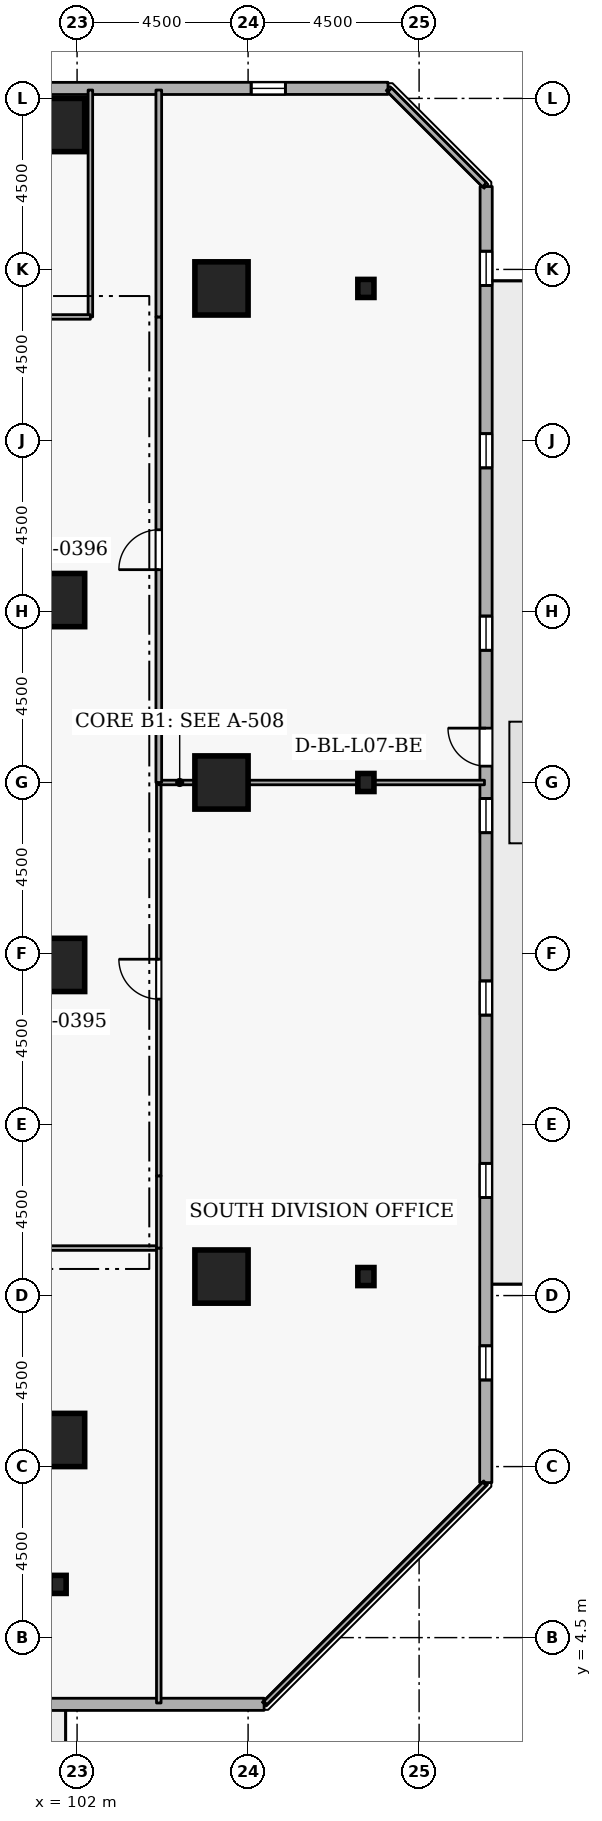
"""IFC4 building model, lengths in metres.
Left out: names, types, materials, properties, quantities, classifications, styles, units other than length and angle.
Written with IfcOpenShell. Run it as: python <this file> out.ifc"""

import sys

from ifc_helpers import new_model, si_unit, direction, frame, frame_2d, origin, origin_2d, place, context, subcontext, project, spatial, rectangle, i_section, extrude, element, fill, save


model = new_model("IFC4")
c1 = context("Model", 3, precision=1e-05, world=origin(), true_north=direction((0.0, 1.0)))
c2 = subcontext(c1, "Body", "Model", "MODEL_VIEW")
j1 = project(units=[si_unit("LENGTHUNIT", "METRE"), si_unit("PLANEANGLEUNIT", "RADIAN")], contexts=[c1])
p1 = place(None, origin())
s1 = spatial("IfcSite", under=j1, at=p1, CompositionType="ELEMENT")
p2 = place(p1, origin())
s2 = spatial("IfcBuilding", under=s1, at=p2, CompositionType="ELEMENT")
p3 = place(p2, frame((0.0, 0.0, 31.5)))
s3 = spatial("IfcBuildingStorey", under=s2, at=p3, CompositionType="ELEMENT", Elevation=31.5)
for number, where, z_axis, x_axis in (
    (1, (105.8, 14.0, 0.0), (0.0, 0.0, 1.0), (1.0, 0.0, 0.0)),
    (2, (105.8, 27.0, 0.0), (0.0, 0.0, 1.0), (1.0, 0.0, 0.0)),
    (3, (105.8, 40.0, 0.0), (0.0, 0.0, 1.0), (1.0, 0.0, 0.0)),
    (4, (101.5, 44.3, 0.0), (0.0, 0.0, 1.0), (1.0, 0.0, 0.0)),
    (5, (101.5, 9.7, 0.0), (0.0, 0.0, 1.0), (1.0, 0.0, 0.0)),
    (6, (101.5, 22.2, 0.0), (0.0, 0.0, 1.0), (1.0, 0.0, 0.0)),
    (7, (101.5, 31.8, 0.0), (0.0, 0.0, 1.0), (1.0, 0.0, 0.0)),
):
    element("IfcColumn", number, at=place(p3, frame(where, z_axis=z_axis, x_axis=x_axis)), inside=s3, PredefinedType="COLUMN", context=c2, shape_type="SweptSolid", body=[
        extrude(rectangle(XDim=1.4, YDim=1.4, at=origin_2d()), origin(), (0.0, 0.0, 1.0), 3.6),
    ])
for number, where, z_axis, x_axis in (
    (8, (109.6, 14.0, 0.0), (0.0, 0.0, 1.0), (1.0, 0.0, 0.0)),
    (9, (109.6, 27.0, 0.0), (0.0, 0.0, 1.0), (1.0, 0.0, 0.0)),
    (10, (109.6, 40.0, 0.0), (0.0, 0.0, 1.0), (1.0, 0.0, 0.0)),
    (11, (101.5, 5.9, 0.0), (0.0, 0.0, 1.0), (1.0, 0.0, 0.0)),
):
    element("IfcColumn", number, at=place(p3, frame(where, z_axis=z_axis, x_axis=x_axis)), inside=s3, PredefinedType="COLUMN", context=c2, shape_type="SweptSolid", body=[
        extrude(i_section(OverallWidth=0.424, OverallDepth=0.475, WebThickness=0.048, FlangeThickness=0.077, FilletRadius=0.015, at=origin_2d()), origin(), (0.0, 0.0, 1.0), 3.6),
    ])
p4 = place(p3, frame((72.819, 2.735, 0.0), z_axis=(0.0, 0.0, 1.0), x_axis=(0.999999952618, 0.000307837676, 0.0)))
e12 = element("IfcWall", 12, at=p4, inside=s3, PredefinedType="STANDARD", context=c2, shape_type="SweptSolid", body=[
    extrude(rectangle(XDim=34.103, YDim=0.32, at=frame_2d((17.051, 0.0))), origin(), (0.0, 0.0, 1.0), 2.7),
])
p5 = place(p4, frame((18.851, 0.0, 0.0)))
e13 = element("IfcOpeningElement", 13, at=p5, cuts=e12, PredefinedType="OPENING", context=c2, shape_type="SweptSolid", body=[
    extrude(rectangle(XDim=1.0, YDim=2.08, at=frame_2d((0.5, 1.04))), frame((0.0, 0.17, 0.0), z_axis=(0.0, -1.0, 0.0), x_axis=(1.0, 0.0, 0.0)), (0.0, 0.0, 1.0), 0.34),
])
p6 = place(p4, frame((2.7, 0.0, 0.72)))
e14 = element("IfcOpeningElement", 14, at=p6, cuts=e12, PredefinedType="OPENING", context=c2, shape_type="SweptSolid", body=[
    extrude(rectangle(XDim=0.9, YDim=1.75, at=frame_2d((0.45, 0.875))), frame((0.0, 0.17, 0.0), z_axis=(0.0, -1.0, 0.0), x_axis=(1.0, 0.0, 0.0)), (0.0, 0.0, 1.0), 0.34),
])
p7 = place(p4, frame((7.5, 0.0, 0.72)))
e15 = element("IfcOpeningElement", 15, at=p7, cuts=e12, PredefinedType="OPENING", context=c2, shape_type="SweptSolid", body=[
    extrude(rectangle(XDim=0.9, YDim=1.75, at=frame_2d((0.45, 0.875))), frame((0.0, 0.17, 0.0), z_axis=(0.0, -1.0, 0.0), x_axis=(1.0, 0.0, 0.0)), (0.0, 0.0, 1.0), 0.34),
])
p8 = place(p4, frame((12.3, 0.0, 0.72)))
e16 = element("IfcOpeningElement", 16, at=p8, cuts=e12, PredefinedType="OPENING", context=c2, shape_type="SweptSolid", body=[
    extrude(rectangle(XDim=0.9, YDim=1.75, at=frame_2d((0.45, 0.875))), frame((0.0, 0.17, 0.0), z_axis=(0.0, -1.0, 0.0), x_axis=(1.0, 0.0, 0.0)), (0.0, 0.0, 1.0), 0.34),
])
p9 = place(p4, frame((17.1, 0.0, 0.72)))
e17 = element("IfcOpeningElement", 17, at=p9, cuts=e12, PredefinedType="OPENING", context=c2, shape_type="SweptSolid", body=[
    extrude(rectangle(XDim=0.9, YDim=1.75, at=frame_2d((0.45, 0.875))), frame((0.0, 0.17, 0.0), z_axis=(0.0, -1.0, 0.0), x_axis=(1.0, 0.0, 0.0)), (0.0, 0.0, 1.0), 0.34),
])
p10 = place(p4, frame((21.9, 0.0, 0.72)))
e18 = element("IfcOpeningElement", 18, at=p10, cuts=e12, PredefinedType="OPENING", context=c2, shape_type="SweptSolid", body=[
    extrude(rectangle(XDim=0.9, YDim=1.75, at=frame_2d((0.45, 0.875))), frame((0.0, 0.17, 0.0), z_axis=(0.0, -1.0, 0.0), x_axis=(1.0, 0.0, 0.0)), (0.0, 0.0, 1.0), 0.34),
])
p11 = place(p4, frame((26.7, 0.0, 0.72)))
e19 = element("IfcOpeningElement", 19, at=p11, cuts=e12, PredefinedType="OPENING", context=c2, shape_type="SweptSolid", body=[
    extrude(rectangle(XDim=0.9, YDim=1.75, at=frame_2d((0.45, 0.875))), frame((0.0, 0.17, 0.0), z_axis=(0.0, -1.0, 0.0), x_axis=(1.0, 0.0, 0.0)), (0.0, 0.0, 1.0), 0.34),
])
p12 = place(p3, frame((112.754, 8.579, 0.0), z_axis=(0.0, 0.0, 1.0), x_axis=(0.000307837676, 0.999999952618, 0.0)))
e20 = element("IfcWall", 20, at=p12, inside=s3, PredefinedType="STANDARD", context=c2, shape_type="SweptSolid", body=[
    extrude(rectangle(XDim=34.103, YDim=0.32, at=frame_2d((17.051, 0.0))), origin(), (0.0, 0.0, 1.0), 2.7),
])
p13 = place(p12, frame((18.851, 0.0, 0.0)))
e21 = element("IfcOpeningElement", 21, at=p13, cuts=e20, PredefinedType="OPENING", context=c2, shape_type="SweptSolid", body=[
    extrude(rectangle(XDim=1.0, YDim=2.08, at=frame_2d((0.5, 1.04))), frame((0.0, 0.17, 0.0), z_axis=(0.0, -1.0, 0.0), x_axis=(1.0, 0.0, 0.0)), (0.0, 0.0, 1.0), 0.34),
])
p14 = place(p12, frame((2.7, 0.0, 0.72)))
e22 = element("IfcOpeningElement", 22, at=p14, cuts=e20, PredefinedType="OPENING", context=c2, shape_type="SweptSolid", body=[
    extrude(rectangle(XDim=0.9, YDim=1.75, at=frame_2d((0.45, 0.875))), frame((0.0, 0.17, 0.0), z_axis=(0.0, -1.0, 0.0), x_axis=(1.0, 0.0, 0.0)), (0.0, 0.0, 1.0), 0.34),
])
p15 = place(p12, frame((7.5, 0.0, 0.72)))
e23 = element("IfcOpeningElement", 23, at=p15, cuts=e20, PredefinedType="OPENING", context=c2, shape_type="SweptSolid", body=[
    extrude(rectangle(XDim=0.9, YDim=1.75, at=frame_2d((0.45, 0.875))), frame((0.0, 0.17, 0.0), z_axis=(0.0, -1.0, 0.0), x_axis=(1.0, 0.0, 0.0)), (0.0, 0.0, 1.0), 0.34),
])
p16 = place(p12, frame((12.3, 0.0, 0.72)))
e24 = element("IfcOpeningElement", 24, at=p16, cuts=e20, PredefinedType="OPENING", context=c2, shape_type="SweptSolid", body=[
    extrude(rectangle(XDim=0.9, YDim=1.75, at=frame_2d((0.45, 0.875))), frame((0.0, 0.17, 0.0), z_axis=(0.0, -1.0, 0.0), x_axis=(1.0, 0.0, 0.0)), (0.0, 0.0, 1.0), 0.34),
])
p17 = place(p12, frame((17.1, 0.0, 0.72)))
e25 = element("IfcOpeningElement", 25, at=p17, cuts=e20, PredefinedType="OPENING", context=c2, shape_type="SweptSolid", body=[
    extrude(rectangle(XDim=0.9, YDim=1.75, at=frame_2d((0.45, 0.875))), frame((0.0, 0.17, 0.0), z_axis=(0.0, -1.0, 0.0), x_axis=(1.0, 0.0, 0.0)), (0.0, 0.0, 1.0), 0.34),
])
p18 = place(p12, frame((21.9, 0.0, 0.72)))
e26 = element("IfcOpeningElement", 26, at=p18, cuts=e20, PredefinedType="OPENING", context=c2, shape_type="SweptSolid", body=[
    extrude(rectangle(XDim=0.9, YDim=1.75, at=frame_2d((0.45, 0.875))), frame((0.0, 0.17, 0.0), z_axis=(0.0, -1.0, 0.0), x_axis=(1.0, 0.0, 0.0)), (0.0, 0.0, 1.0), 0.34),
])
p19 = place(p12, frame((26.7, 0.0, 0.72)))
e27 = element("IfcOpeningElement", 27, at=p19, cuts=e20, PredefinedType="OPENING", context=c2, shape_type="SweptSolid", body=[
    extrude(rectangle(XDim=0.9, YDim=1.75, at=frame_2d((0.45, 0.875))), frame((0.0, 0.17, 0.0), z_axis=(0.0, -1.0, 0.0), x_axis=(1.0, 0.0, 0.0)), (0.0, 0.0, 1.0), 0.34),
])
p20 = place(p12, frame((31.5, 0.0, 0.72)))
e28 = element("IfcOpeningElement", 28, at=p20, cuts=e20, PredefinedType="OPENING", context=c2, shape_type="SweptSolid", body=[
    extrude(rectangle(XDim=0.9, YDim=1.75, at=frame_2d((0.45, 0.875))), frame((0.0, 0.17, 0.0), z_axis=(0.0, -1.0, 0.0), x_axis=(1.0, 0.0, 0.0)), (0.0, 0.0, 1.0), 0.34),
])
p21 = place(p3, frame((110.181, 45.265, 0.0), z_axis=(0.0, 0.0, 1.0), x_axis=(-0.999999952618, -0.000307837676, 0.0)))
e29 = element("IfcWall", 29, at=p21, inside=s3, PredefinedType="STANDARD", context=c2, shape_type="SweptSolid", body=[
    extrude(rectangle(XDim=34.103, YDim=0.32, at=frame_2d((17.051, 0.0))), origin(), (0.0, 0.0, 1.0), 2.7),
])
p22 = place(p21, frame((2.7, 0.0, 0.72)))
e30 = element("IfcOpeningElement", 30, at=p22, cuts=e29, PredefinedType="OPENING", context=c2, shape_type="SweptSolid", body=[
    extrude(rectangle(XDim=0.9, YDim=1.75, at=frame_2d((0.45, 0.875))), frame((0.0, 0.17, 0.0), z_axis=(0.0, -1.0, 0.0), x_axis=(1.0, 0.0, 0.0)), (0.0, 0.0, 1.0), 0.34),
])
p23 = place(p21, frame((12.3, 0.0, 0.72)))
e31 = element("IfcOpeningElement", 31, at=p23, cuts=e29, PredefinedType="OPENING", context=c2, shape_type="SweptSolid", body=[
    extrude(rectangle(XDim=0.9, YDim=1.75, at=frame_2d((0.45, 0.875))), frame((0.0, 0.17, 0.0), z_axis=(0.0, -1.0, 0.0), x_axis=(1.0, 0.0, 0.0)), (0.0, 0.0, 1.0), 0.34),
])
p24 = place(p21, frame((17.1, 0.0, 0.72)))
e32 = element("IfcOpeningElement", 32, at=p24, cuts=e29, PredefinedType="OPENING", context=c2, shape_type="SweptSolid", body=[
    extrude(rectangle(XDim=0.9, YDim=1.75, at=frame_2d((0.45, 0.875))), frame((0.0, 0.17, 0.0), z_axis=(0.0, -1.0, 0.0), x_axis=(1.0, 0.0, 0.0)), (0.0, 0.0, 1.0), 0.34),
])
p25 = place(p21, frame((26.7, 0.0, 0.72)))
e33 = element("IfcOpeningElement", 33, at=p25, cuts=e29, PredefinedType="OPENING", context=c2, shape_type="SweptSolid", body=[
    extrude(rectangle(XDim=0.9, YDim=1.75, at=frame_2d((0.45, 0.875))), frame((0.0, 0.17, 0.0), z_axis=(0.0, -1.0, 0.0), x_axis=(1.0, 0.0, 0.0)), (0.0, 0.0, 1.0), 0.34),
])
p26 = place(p21, frame((31.5, 0.0, 0.72)))
e34 = element("IfcOpeningElement", 34, at=p26, cuts=e29, PredefinedType="OPENING", context=c2, shape_type="SweptSolid", body=[
    extrude(rectangle(XDim=0.9, YDim=1.75, at=frame_2d((0.45, 0.875))), frame((0.0, 0.17, 0.0), z_axis=(0.0, -1.0, 0.0), x_axis=(1.0, 0.0, 0.0)), (0.0, 0.0, 1.0), 0.34),
])
p27 = place(p3, frame((94.8, 14.75, 0.0), z_axis=(0.0, 0.0, 1.0), x_axis=(1.0, 0.0, 0.0)))
e35 = element("IfcWall", 35, at=p27, inside=s3, PredefinedType="PARTITIONING", context=c2, shape_type="SweptSolid", body=[
    extrude(rectangle(XDim=9.35, YDim=0.12, at=frame_2d((4.675, 0.0))), origin(), (0.0, 0.0, 1.0), 3.34),
])
p28 = place(p27, frame((4.15, 0.0, 0.0)))
e36 = element("IfcOpeningElement", 36, at=p28, cuts=e35, PredefinedType="OPENING", context=c2, shape_type="SweptSolid", body=[
    extrude(rectangle(XDim=1.05, YDim=2.1, at=frame_2d((0.525, 1.05))), frame((0.0, 0.07, 0.0), z_axis=(0.0, -1.0, 0.0), x_axis=(1.0, 0.0, 0.0)), (0.0, 0.0, 1.0), 0.14),
])
p29 = place(p3, frame((104.15, 14.75, 0.0), z_axis=(0.0, 0.0, 1.0), x_axis=(0.0, -1.0, 0.0)))
e37 = element("IfcWall", 37, at=p29, inside=s3, PredefinedType="PARTITIONING", context=c2, shape_type="SweptSolid", body=[
    extrude(rectangle(XDim=11.97, YDim=0.12, at=frame_2d((5.985, 0.0))), origin(), (0.0, 0.0, 1.0), 3.34),
])
p30 = place(p3, frame((102.35, 45.22, 0.0), z_axis=(0.0, 0.0, 1.0), x_axis=(0.0, -1.0, 0.0)))
e38 = element("IfcWall", 38, at=p30, inside=s3, PredefinedType="PARTITIONING", context=c2, shape_type="SweptSolid", body=[
    extrude(rectangle(XDim=5.97, YDim=0.12, at=frame_2d((2.985, 0.0))), origin(), (0.0, 0.0, 1.0), 3.34),
])
p31 = place(p3, frame((102.35, 39.25, 0.0), z_axis=(0.0, 0.0, 1.0), x_axis=(-1.0, 0.0, 0.0)))
e39 = element("IfcWall", 39, at=p31, inside=s3, PredefinedType="PARTITIONING", context=c2, shape_type="SweptSolid", body=[
    extrude(rectangle(XDim=1.862, YDim=0.12, at=frame_2d((0.931, 0.0))), origin(), (0.0, 0.0, 1.0), 3.34),
])
p32 = place(p3, frame((104.15, 14.75, 0.0), z_axis=(0.0, 0.0, 1.0), x_axis=(0.0, 1.0, 0.0)))
e40 = element("IfcWall", 40, at=p32, inside=s3, PredefinedType="PARTITIONING", context=c2, shape_type="SweptSolid", body=[
    extrude(rectangle(XDim=1.9, YDim=0.12, at=frame_2d((0.95, 0.0))), origin(), (0.0, 0.0, 1.0), 3.34),
])
p33 = place(p3, frame((104.15, 16.65, 0.0), z_axis=(0.0, 0.0, 1.0), x_axis=(0.0, 1.0, 0.0)))
e41 = element("IfcWall", 41, at=p33, inside=s3, PredefinedType="PARTITIONING", context=c2, shape_type="SweptSolid", body=[
    extrude(rectangle(XDim=10.35, YDim=0.12, at=frame_2d((5.175, 0.0))), origin(), (0.0, 0.0, 1.0), 3.34),
])
p34 = place(p33, frame((4.65, 0.0, 0.0)))
e42 = element("IfcOpeningElement", 42, at=p34, cuts=e41, PredefinedType="OPENING", context=c2, shape_type="SweptSolid", body=[
    extrude(rectangle(XDim=1.05, YDim=2.1, at=frame_2d((0.525, 1.05))), frame((0.0, 0.07, 0.0), z_axis=(0.0, -1.0, 0.0), x_axis=(1.0, 0.0, 0.0)), (0.0, 0.0, 1.0), 0.14),
])
p35 = place(p3, frame((104.15, 27.0, 0.0), z_axis=(0.0, 0.0, 1.0), x_axis=(1.0, 0.0, 0.0)))
e43 = element("IfcWall", 43, at=p35, inside=s3, PredefinedType="PARTITIONING", context=c2, shape_type="SweptSolid", body=[
    extrude(rectangle(XDim=8.57, YDim=0.12, at=frame_2d((4.285, 0.0))), origin(), (0.0, 0.0, 1.0), 2.878),
])
p36 = place(p3, frame((112.72, 8.548, 0.0), z_axis=(0.0, 0.0, 1.0), x_axis=(-0.707106781187, -0.707106781187, 0.0)))
e44 = element("IfcWall", 44, at=p36, inside=s3, PredefinedType="PARTITIONING", context=c2, shape_type="SweptSolid", body=[
    extrude(rectangle(XDim=8.156, YDim=0.12, at=frame_2d((4.078, 0.0))), origin(), (0.0, 0.0, 1.0), 3.34),
])
p37 = place(p3, frame((104.15, 27.0, 0.0), z_axis=(0.0, 0.0, 1.0), x_axis=(0.0, 1.0, 0.0)))
e45 = element("IfcWall", 45, at=p37, inside=s3, PredefinedType="PARTITIONING", context=c2, shape_type="SweptSolid", body=[
    extrude(rectangle(XDim=12.25, YDim=0.15, at=frame_2d((6.125, 0.0))), origin(), (0.0, 0.0, 1.0), 3.34),
])
p38 = place(p37, frame((5.6, 0.0, 0.0)))
e46 = element("IfcOpeningElement", 46, at=p38, cuts=e45, PredefinedType="OPENING", context=c2, shape_type="SweptSolid", body=[
    extrude(rectangle(XDim=1.05, YDim=2.1, at=frame_2d((0.525, 1.05))), frame((0.0, 0.085, 0.0), z_axis=(0.0, -1.0, 0.0), x_axis=(1.0, 0.0, 0.0)), (0.0, 0.0, 1.0), 0.17),
])
p39 = place(p3, frame((104.15, 39.25, 0.0), z_axis=(0.0, 0.0, 1.0), x_axis=(0.0, 1.0, 0.0)))
e47 = element("IfcWall", 47, at=p39, inside=s3, PredefinedType="PARTITIONING", context=c2, shape_type="SweptSolid", body=[
    extrude(rectangle(XDim=5.97, YDim=0.15, at=frame_2d((2.985, 0.0))), origin(), (0.0, 0.0, 1.0), 3.34),
])
p40 = place(p3, frame((110.225, 45.22, 0.0), z_axis=(0.0, 0.0, 1.0), x_axis=(0.707106781187, -0.707106781187, 0.0)))
e48 = element("IfcWall", 48, at=p40, inside=s3, PredefinedType="PARTITIONING", context=c2, shape_type="SweptSolid", body=[
    extrude(rectangle(XDim=3.528, YDim=0.15, at=frame_2d((1.764, 0.0))), origin(), (0.0, 0.0, 1.0), 3.34),
])
p41 = place(p13, origin())
e49 = element("IfcDoor", 49, at=p41, inside=s3, OperationType="SINGLE_SWING_RIGHT", PredefinedType="DOOR", context=c2, shape_type="SweptSolid", body=[
    extrude(rectangle(XDim=1.0, YDim=2.08, at=frame_2d((0.5, 1.04))), frame((0.0, 0.025, 0.0), z_axis=(0.0, -1.0, 0.0), x_axis=(1.0, 0.0, 0.0)), (0.0, 0.0, 1.0), 0.05),
])
fill(e21, e49)
p42 = place(p14, origin())
e50 = element("IfcWindow", 50, at=p42, inside=s3, PartitioningType="SINGLE_PANEL", PredefinedType="WINDOW", context=c2, shape_type="SweptSolid", body=[
    extrude(rectangle(XDim=0.9, YDim=1.75, at=frame_2d((0.45, 0.875))), frame((0.0, 0.03, 0.0), z_axis=(0.0, -1.0, 0.0), x_axis=(1.0, 0.0, 0.0)), (0.0, 0.0, 1.0), 0.06),
])
fill(e22, e50)
p43 = place(p15, origin())
e51 = element("IfcWindow", 51, at=p43, inside=s3, PartitioningType="SINGLE_PANEL", PredefinedType="WINDOW", context=c2, shape_type="SweptSolid", body=[
    extrude(rectangle(XDim=0.9, YDim=1.75, at=frame_2d((0.45, 0.875))), frame((0.0, 0.03, 0.0), z_axis=(0.0, -1.0, 0.0), x_axis=(1.0, 0.0, 0.0)), (0.0, 0.0, 1.0), 0.06),
])
fill(e23, e51)
p44 = place(p16, origin())
e52 = element("IfcWindow", 52, at=p44, inside=s3, PartitioningType="SINGLE_PANEL", PredefinedType="WINDOW", context=c2, shape_type="SweptSolid", body=[
    extrude(rectangle(XDim=0.9, YDim=1.75, at=frame_2d((0.45, 0.875))), frame((0.0, 0.03, 0.0), z_axis=(0.0, -1.0, 0.0), x_axis=(1.0, 0.0, 0.0)), (0.0, 0.0, 1.0), 0.06),
])
fill(e24, e52)
p45 = place(p17, origin())
e53 = element("IfcWindow", 53, at=p45, inside=s3, PartitioningType="SINGLE_PANEL", PredefinedType="WINDOW", context=c2, shape_type="SweptSolid", body=[
    extrude(rectangle(XDim=0.9, YDim=1.75, at=frame_2d((0.45, 0.875))), frame((0.0, 0.03, 0.0), z_axis=(0.0, -1.0, 0.0), x_axis=(1.0, 0.0, 0.0)), (0.0, 0.0, 1.0), 0.06),
])
fill(e25, e53)
p46 = place(p18, origin())
e54 = element("IfcWindow", 54, at=p46, inside=s3, PartitioningType="SINGLE_PANEL", PredefinedType="WINDOW", context=c2, shape_type="SweptSolid", body=[
    extrude(rectangle(XDim=0.9, YDim=1.75, at=frame_2d((0.45, 0.875))), frame((0.0, 0.03, 0.0), z_axis=(0.0, -1.0, 0.0), x_axis=(1.0, 0.0, 0.0)), (0.0, 0.0, 1.0), 0.06),
])
fill(e26, e54)
p47 = place(p19, origin())
e55 = element("IfcWindow", 55, at=p47, inside=s3, PartitioningType="SINGLE_PANEL", PredefinedType="WINDOW", context=c2, shape_type="SweptSolid", body=[
    extrude(rectangle(XDim=0.9, YDim=1.75, at=frame_2d((0.45, 0.875))), frame((0.0, 0.03, 0.0), z_axis=(0.0, -1.0, 0.0), x_axis=(1.0, 0.0, 0.0)), (0.0, 0.0, 1.0), 0.06),
])
fill(e27, e55)
p48 = place(p20, origin())
e56 = element("IfcWindow", 56, at=p48, inside=s3, PartitioningType="SINGLE_PANEL", PredefinedType="WINDOW", context=c2, shape_type="SweptSolid", body=[
    extrude(rectangle(XDim=0.9, YDim=1.75, at=frame_2d((0.45, 0.875))), frame((0.0, 0.03, 0.0), z_axis=(0.0, -1.0, 0.0), x_axis=(1.0, 0.0, 0.0)), (0.0, 0.0, 1.0), 0.06),
])
fill(e28, e56)
p49 = place(p22, origin())
e57 = element("IfcWindow", 57, at=p49, inside=s3, PartitioningType="SINGLE_PANEL", PredefinedType="WINDOW", context=c2, shape_type="SweptSolid", body=[
    extrude(rectangle(XDim=0.9, YDim=1.75, at=frame_2d((0.45, 0.875))), frame((0.0, 0.03, 0.0), z_axis=(0.0, -1.0, 0.0), x_axis=(1.0, 0.0, 0.0)), (0.0, 0.0, 1.0), 0.06),
])
fill(e30, e57)
p50 = place(p34, origin())
e58 = element("IfcDoor", 58, at=p50, inside=s3, OperationType="SINGLE_SWING_RIGHT", PredefinedType="DOOR", context=c2, shape_type="SweptSolid", body=[
    extrude(rectangle(XDim=1.05, YDim=2.1, at=frame_2d((0.525, 1.05))), frame((0.0, 0.025, 0.0), z_axis=(0.0, -1.0, 0.0), x_axis=(1.0, 0.0, 0.0)), (0.0, 0.0, 1.0), 0.05),
])
fill(e42, e58)
p51 = place(p38, origin())
e59 = element("IfcDoor", 59, at=p51, inside=s3, OperationType="SINGLE_SWING_LEFT", PredefinedType="DOOR", context=c2, shape_type="SweptSolid", body=[
    extrude(rectangle(XDim=1.05, YDim=2.1, at=frame_2d((0.525, 1.05))), frame((0.0, 0.025, 0.0), z_axis=(0.0, -1.0, 0.0), x_axis=(1.0, 0.0, 0.0)), (0.0, 0.0, 1.0), 0.05),
])
fill(e46, e59)
save(model, sys.argv[1])
